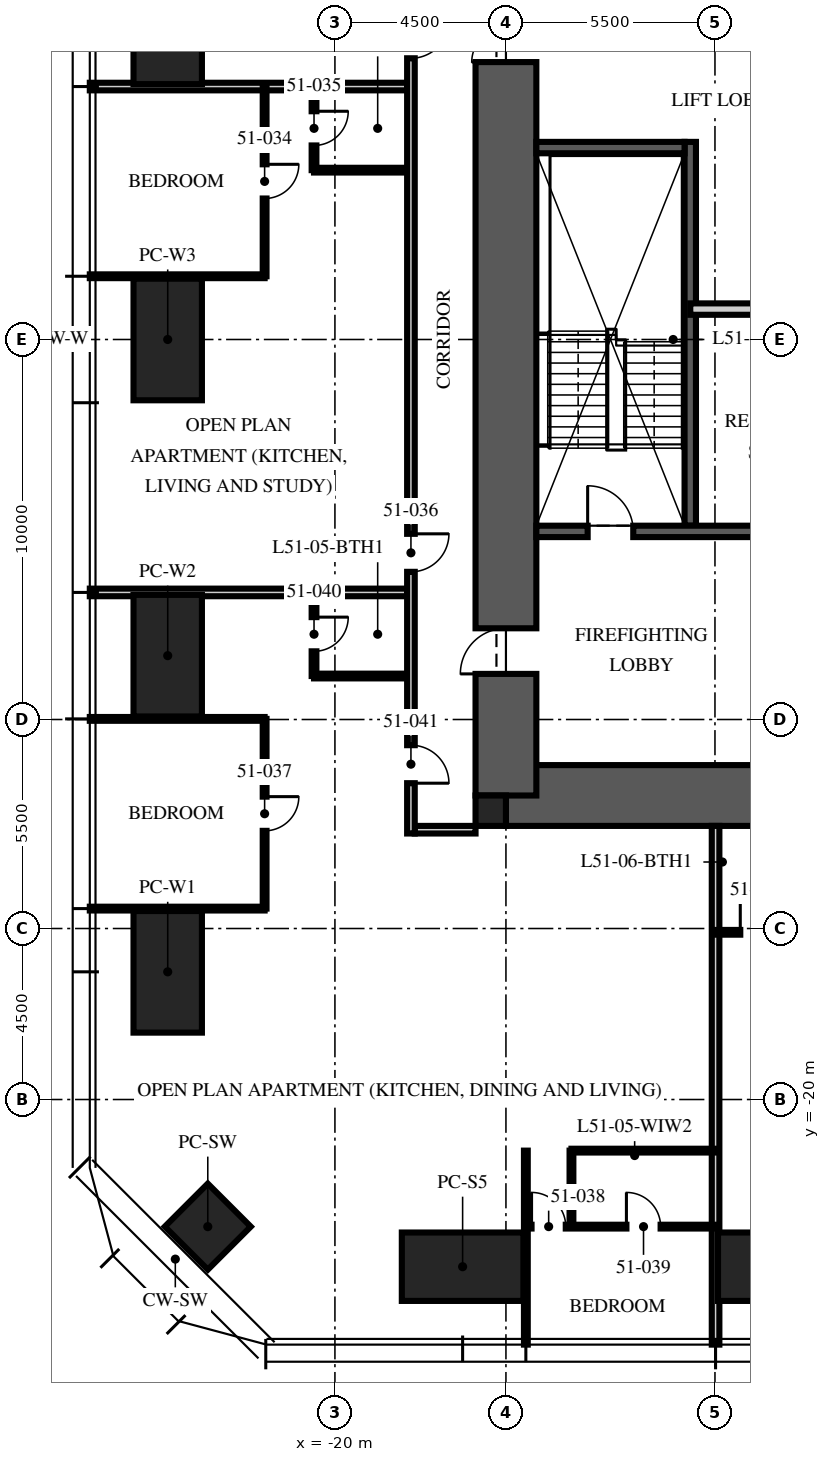
"""IFC4 building model, lengths in metres.
Left out: names, types, materials, properties, quantities, classifications, styles, units other than length and angle.
Written with IfcOpenShell. Run it as: python <this file> out.ifc"""

import sys

from ifc_helpers import new_model, si_unit, direction, frame, frame_2d, origin, origin_2d, place, context, subcontext, project, spatial, rectangle, hollow_rectangle, extrude, element, fill, save


model = new_model("IFC4")
c1 = context("Model", 3, precision=1e-05, world=origin(), true_north=direction((0.0, 1.0)))
c2 = subcontext(c1, "Body", "Model", "MODEL_VIEW")
j1 = project(units=[si_unit("LENGTHUNIT", "METRE"), si_unit("PLANEANGLEUNIT", "RADIAN")], contexts=[c1])
p1 = place(None, origin())
s1 = spatial("IfcSite", under=j1, at=p1, CompositionType="ELEMENT")
p2 = place(p1, origin())
s2 = spatial("IfcBuilding", under=s1, at=p2, CompositionType="ELEMENT")
p3 = place(p2, frame((0.0, 0.0, 207.0)))
s3 = spatial("IfcBuildingStorey", under=s2, at=p3, CompositionType="ELEMENT", Elevation=207.0)
p4 = place(p3, frame((-15.5, -12.0, -0.25), z_axis=(0.0, 0.0, 1.0), x_axis=(1.0, 0.0, 0.0)))
e1 = element("IfcWall", 1, at=p4, inside=s3, PredefinedType="SHEAR", context=c2, shape_type="SweptSolid", body=[
    extrude(rectangle(XDim=31.0, YDim=1.6, at=frame_2d((15.5, 0.0))), origin(), (0.0, 0.0, 1.0), 3.75),
])
p5 = place(p3, frame((-15.5, -12.0, -0.25), z_axis=(0.0, 0.0, 1.0), x_axis=(0.0, 1.0, 0.0)))
e2 = element("IfcWall", 2, at=p5, inside=s3, PredefinedType="SHEAR", context=c2, shape_type="SweptSolid", body=[
    extrude(rectangle(XDim=24.0, YDim=1.6, at=frame_2d((12.0, 0.0))), origin(), (0.0, 0.0, 1.0), 3.75),
])
p6 = place(p5, frame((3.2, 0.0, 0.25)))
e3 = element("IfcOpeningElement", 3, at=p6, cuts=e2, PredefinedType="OPENING", context=c2, shape_type="SweptSolid", body=[
    extrude(rectangle(XDim=1.2, YDim=2.1, at=frame_2d((0.6, 1.05))), frame((0.0, 0.81, 0.0), z_axis=(0.0, -1.0, 0.0), x_axis=(1.0, 0.0, 0.0)), (0.0, 0.0, 1.0), 1.62),
])
p7 = place(p5, frame((19.3, 0.0, 0.25)))
e4 = element("IfcOpeningElement", 4, at=p7, cuts=e2, PredefinedType="OPENING", context=c2, shape_type="SweptSolid", body=[
    extrude(rectangle(XDim=1.8, YDim=2.1, at=frame_2d((0.9, 1.05))), frame((0.0, 0.81, 0.0), z_axis=(0.0, -1.0, 0.0), x_axis=(1.0, 0.0, 0.0)), (0.0, 0.0, 1.0), 1.62),
])
p8 = place(p3, frame((-15.9, -12.4, -0.25), z_axis=(0.0, 0.0, 1.0), x_axis=(1.0, 0.0, 0.0)))
e5 = element("IfcColumn", 5, at=p8, inside=s3, PredefinedType="COLUMN", context=c2, shape_type="SweptSolid", body=[
    extrude(rectangle(XDim=0.8, YDim=0.8, at=origin_2d()), origin(), (0.0, 0.0, 1.0), 3.75),
])
for number, where, z_axis, x_axis in (
    (6, (-8.32, -24.4, 0.0), (0.0, 0.0, 1.0), (1.0, 0.0, 0.0)),
    (7, (-16.64, -24.4, 0.0), (0.0, 0.0, 1.0), (1.0, 0.0, 0.0)),
    (8, (-24.4, -16.64, 0.0), (0.0, 0.0, 1.0), (0.0, 1.0, 0.0)),
    (9, (-24.4, -8.32, 0.0), (0.0, 0.0, 1.0), (0.0, 1.0, 0.0)),
    (10, (-24.4, 0.0, 0.0), (0.0, 0.0, 1.0), (0.0, 1.0, 0.0)),
    (11, (-24.4, 8.32, 0.0), (0.0, 0.0, 1.0), (0.0, 1.0, 0.0)),
):
    element("IfcColumn", number, at=place(p3, frame(where, z_axis=z_axis, x_axis=x_axis)), inside=s3, PredefinedType="COLUMN", context=c2, shape_type="SweptSolid", body=[
        extrude(hollow_rectangle(XDim=3.2, YDim=1.8, WallThickness=0.2, at=origin_2d()), origin(), (0.0, 0.0, 1.0), 3.75),
    ])
p9 = place(p3, frame((-23.346, -23.346, 0.0), z_axis=(0.0, 0.0, 1.0), x_axis=(0.707106781187, -0.707106781187, 0.0)))
e12 = element("IfcColumn", 12, at=p9, inside=s3, PredefinedType="COLUMN", context=c2, shape_type="SweptSolid", body=[
    extrude(hollow_rectangle(XDim=1.6, YDim=1.6, WallThickness=0.1, at=origin_2d()), origin(), (0.0, 0.0, 1.0), 3.75),
])
p10 = place(p3, frame((-10.65, -4.9, 0.0), z_axis=(0.0, 0.0, 1.0), x_axis=(0.0, 1.0, 0.0)))
e13 = element("IfcWall", 13, at=p10, inside=s3, PredefinedType="SOLIDWALL", context=c2, shape_type="SweptSolid", body=[
    extrude(rectangle(XDim=10.1, YDim=0.3, at=frame_2d((5.05, 0.0))), origin(), (0.0, 0.0, 1.0), 3.5),
])
p11 = place(p3, frame((-14.7, -5.05, 0.0), z_axis=(0.0, 0.0, 1.0), x_axis=(1.0, 0.0, 0.0)))
e14 = element("IfcWall", 14, at=p11, inside=s3, PredefinedType="SOLIDWALL", context=c2, shape_type="SweptSolid", body=[
    extrude(rectangle(XDim=5.9, YDim=0.3, at=frame_2d((2.95, 0.0))), origin(), (0.0, 0.0, 1.0), 3.5),
])
p12 = place(p11, frame((1.35, 0.0, 0.0)))
e15 = element("IfcOpeningElement", 15, at=p12, cuts=e14, PredefinedType="OPENING", context=c2, shape_type="SweptSolid", body=[
    extrude(rectangle(XDim=1.2, YDim=2.1, at=frame_2d((0.6, 1.05))), frame((0.0, 0.16, 0.0), z_axis=(0.0, -1.0, 0.0), x_axis=(1.0, 0.0, 0.0)), (0.0, 0.0, 1.0), 0.32),
])
p13 = place(p3, frame((-14.7, 5.05, 0.0), z_axis=(0.0, 0.0, 1.0), x_axis=(1.0, 0.0, 0.0)))
e16 = element("IfcWall", 16, at=p13, inside=s3, PredefinedType="SOLIDWALL", context=c2, shape_type="SweptSolid", body=[
    extrude(rectangle(XDim=3.9, YDim=0.3, at=frame_2d((1.95, 0.0))), origin(), (0.0, 0.0, 1.0), 3.5),
])
p14 = place(p3, frame((-10.65, 0.8, 0.0), z_axis=(0.0, 0.0, 1.0), x_axis=(1.0, 0.0, 0.0)))
e17 = element("IfcWall", 17, at=p14, inside=s3, PredefinedType="PARTITIONING", context=c2, shape_type="SweptSolid", body=[
    extrude(rectangle(XDim=21.3, YDim=0.3, at=frame_2d((10.65, 0.0))), origin(), (0.0, 0.0, 1.0), 3.5),
])
p15 = place(p14, frame((10.05, 0.0, 0.0)))
e18 = element("IfcOpeningElement", 18, at=p15, cuts=e17, PredefinedType="OPENING", context=c2, shape_type="SweptSolid", body=[
    extrude(rectangle(XDim=1.2, YDim=2.1, at=frame_2d((0.6, 1.05))), frame((0.0, 0.16, 0.0), z_axis=(0.0, -1.0, 0.0), x_axis=(1.0, 0.0, 0.0)), (0.0, 0.0, 1.0), 0.32),
])
p16 = place(p14, frame((1.74, 0.0, 0.0)))
e19 = element("IfcOpeningElement", 19, at=p16, cuts=e17, PredefinedType="OPENING", context=c2, shape_type="SweptSolid", body=[
    extrude(rectangle(XDim=0.9, YDim=2.1, at=frame_2d((0.45, 1.05))), frame((0.0, 0.16, 0.0), z_axis=(0.0, -1.0, 0.0), x_axis=(1.0, 0.0, 0.0)), (0.0, 0.0, 1.0), 0.32),
])
p17 = place(p3, frame((-16.3, -12.9, 0.0), z_axis=(0.0, 0.0, 1.0), x_axis=(-1.0, 0.0, 0.0)))
e20 = element("IfcWall", 20, at=p17, inside=s3, PredefinedType="PARTITIONING", context=c2, shape_type="SweptSolid", body=[
    extrude(rectangle(XDim=1.6, YDim=0.2, at=frame_2d((0.8, 0.0))), origin(), (0.0, 0.0, 1.0), 2.3),
])
p18 = place(p3, frame((-18.1, 6.656, 0.0), z_axis=(0.0, 0.0, 1.0), x_axis=(-1.0, 0.0, 0.0)))
e21 = element("IfcWall", 21, at=p18, inside=s3, PredefinedType="PARTITIONING", context=c2, shape_type="SweptSolid", body=[
    extrude(rectangle(XDim=8.35, YDim=0.2, at=frame_2d((4.175, 0.0))), origin(), (0.0, 0.0, 1.0), 2.91),
])
p19 = place(p3, frame((-21.85, 1.664, 0.0), z_axis=(0.0, 0.0, 1.0), x_axis=(-1.0, 0.0, 0.0)))
e22 = element("IfcWall", 22, at=p19, inside=s3, PredefinedType="PARTITIONING", context=c2, shape_type="SweptSolid", body=[
    extrude(rectangle(XDim=4.6, YDim=0.1, at=frame_2d((2.3, 0.0))), origin(), (0.0, 0.0, 1.0), 2.91),
])
p20 = place(p3, frame((-18.1, -6.656, 0.0), z_axis=(0.0, 0.0, 1.0), x_axis=(-1.0, 0.0, 0.0)))
e23 = element("IfcWall", 23, at=p20, inside=s3, PredefinedType="PARTITIONING", context=c2, shape_type="SweptSolid", body=[
    extrude(rectangle(XDim=8.35, YDim=0.2, at=frame_2d((4.175, 0.0))), origin(), (0.0, 0.0, 1.0), 2.91),
])
for number, where, z_axis, x_axis in (
    (24, (-21.85, -9.984, 0.0), (0.0, 0.0, 1.0), (-1.0, 0.0, 0.0)),
    (25, (-21.85, -14.976, 0.0), (0.0, 0.0, 1.0), (-1.0, 0.0, 0.0)),
):
    element("IfcWall", number, at=place(p3, frame(where, z_axis=z_axis, x_axis=x_axis)), inside=s3, PredefinedType="PARTITIONING", context=c2, shape_type="SweptSolid", body=[
        extrude(rectangle(XDim=4.6, YDim=0.1, at=frame_2d((2.3, 0.0))), origin(), (0.0, 0.0, 1.0), 2.91),
    ])
p21 = place(p3, frame((-14.976, -21.345, 0.0), z_axis=(0.0, 0.0, 1.0), x_axis=(0.0, -1.0, 0.0)))
e26 = element("IfcWall", 26, at=p21, inside=s3, PredefinedType="PARTITIONING", context=c2, shape_type="SweptSolid", body=[
    extrude(rectangle(XDim=5.105, YDim=0.1, at=frame_2d((2.552, 0.0))), origin(), (0.0, 0.0, 1.0), 2.91),
])
p22 = place(p3, frame((-9.984, -12.8, 0.0), z_axis=(0.0, 0.0, 1.0), x_axis=(0.0, -1.0, 0.0)))
e27 = element("IfcWall", 27, at=p22, inside=s3, PredefinedType="PARTITIONING", context=c2, shape_type="SweptSolid", body=[
    extrude(rectangle(XDim=13.65, YDim=0.2, at=frame_2d((6.825, 0.0))), origin(), (0.0, 0.0, 1.0), 2.91),
])
p23 = place(p3, frame((-21.85, 6.656, 0.0), z_axis=(0.0, 0.0, 1.0), x_axis=(0.0, -1.0, 0.0)))
e28 = element("IfcWall", 28, at=p23, inside=s3, PredefinedType="PARTITIONING", context=c2, shape_type="SweptSolid", body=[
    extrude(rectangle(XDim=4.992, YDim=0.1, at=frame_2d((2.496, 0.0))), origin(), (0.0, 0.0, 1.0), 2.81),
])
p24 = place(p23, frame((2.046, 0.0, 0.0)))
e29 = element("IfcOpeningElement", 29, at=p24, cuts=e28, PredefinedType="OPENING", context=c2, shape_type="SweptSolid", body=[
    extrude(rectangle(XDim=0.9, YDim=2.1, at=frame_2d((0.45, 1.05))), frame((0.0, 0.06, 0.0), z_axis=(0.0, -1.0, 0.0), x_axis=(1.0, 0.0, 0.0)), (0.0, 0.0, 1.0), 0.12),
])
p25 = place(p3, frame((-20.55, 6.656, 0.0), z_axis=(0.0, 0.0, 1.0), x_axis=(0.0, -1.0, 0.0)))
e30 = element("IfcWall", 30, at=p25, inside=s3, PredefinedType="PARTITIONING", context=c2, shape_type="SweptSolid", body=[
    extrude(rectangle(XDim=2.2, YDim=0.125, at=frame_2d((1.1, 0.0))), origin(), (0.0, 0.0, 1.0), 3.5),
])
p26 = place(p25, frame((0.65, 0.0, 0.0)))
e31 = element("IfcOpeningElement", 31, at=p26, cuts=e30, PredefinedType="OPENING", context=c2, shape_type="SweptSolid", body=[
    extrude(rectangle(XDim=0.9, YDim=2.1, at=frame_2d((0.45, 1.05))), frame((0.0, 0.073, 0.0), z_axis=(0.0, -1.0, 0.0), x_axis=(1.0, 0.0, 0.0)), (0.0, 0.0, 1.0), 0.145),
])
p27 = place(p3, frame((-18.1, 4.456, 0.0), z_axis=(0.0, 0.0, 1.0), x_axis=(-1.0, 0.0, 0.0)))
e32 = element("IfcWall", 32, at=p27, inside=s3, PredefinedType="PARTITIONING", context=c2, shape_type="SweptSolid", body=[
    extrude(rectangle(XDim=2.45, YDim=0.125, at=frame_2d((1.225, 0.0))), origin(), (0.0, 0.0, 1.0), 3.5),
])
p28 = place(p3, frame((-21.85, -9.984, 0.0), z_axis=(0.0, 0.0, 1.0), x_axis=(0.0, -1.0, 0.0)))
e33 = element("IfcWall", 33, at=p28, inside=s3, PredefinedType="PARTITIONING", context=c2, shape_type="SweptSolid", body=[
    extrude(rectangle(XDim=4.992, YDim=0.1, at=frame_2d((2.496, 0.0))), origin(), (0.0, 0.0, 1.0), 2.81),
])
p29 = place(p28, frame((2.046, 0.0, 0.0)))
e34 = element("IfcOpeningElement", 34, at=p29, cuts=e33, PredefinedType="OPENING", context=c2, shape_type="SweptSolid", body=[
    extrude(rectangle(XDim=0.9, YDim=2.1, at=frame_2d((0.45, 1.05))), frame((0.0, 0.06, 0.0), z_axis=(0.0, -1.0, 0.0), x_axis=(1.0, 0.0, 0.0)), (0.0, 0.0, 1.0), 0.12),
])
p30 = place(p3, frame((-14.976, -23.345, 0.0), z_axis=(0.0, 0.0, 1.0), x_axis=(1.0, 0.0, 0.0)))
e35 = element("IfcWall", 35, at=p30, inside=s3, PredefinedType="PARTITIONING", context=c2, shape_type="SweptSolid", body=[
    extrude(rectangle(XDim=4.992, YDim=0.1, at=frame_2d((2.496, 0.0))), origin(), (0.0, 0.0, 1.0), 2.81),
])
p31 = place(p30, frame((0.15, 0.0, 0.0)))
e36 = element("IfcOpeningElement", 36, at=p31, cuts=e35, PredefinedType="OPENING", context=c2, shape_type="SweptSolid", body=[
    extrude(rectangle(XDim=0.9, YDim=2.1, at=frame_2d((0.45, 1.05))), frame((0.0, 0.06, 0.0), z_axis=(0.0, -1.0, 0.0), x_axis=(1.0, 0.0, 0.0)), (0.0, 0.0, 1.0), 0.12),
])
p32 = place(p30, frame((2.646, 0.0, 0.0)))
e37 = element("IfcOpeningElement", 37, at=p32, cuts=e35, PredefinedType="OPENING", context=c2, shape_type="SweptSolid", body=[
    extrude(rectangle(XDim=0.9, YDim=2.1, at=frame_2d((0.45, 1.05))), frame((0.0, 0.06, 0.0), z_axis=(0.0, -1.0, 0.0), x_axis=(1.0, 0.0, 0.0)), (0.0, 0.0, 1.0), 0.12),
])
p33 = place(p3, frame((-13.776, -21.345, 0.0), z_axis=(0.0, 0.0, 1.0), x_axis=(0.0, -1.0, 0.0)))
e38 = element("IfcWall", 38, at=p33, inside=s3, PredefinedType="PARTITIONING", context=c2, shape_type="SweptSolid", body=[
    extrude(rectangle(XDim=2.0, YDim=0.1, at=frame_2d((1.0, 0.0))), origin(), (0.0, 0.0, 1.0), 3.5),
])
p34 = place(p3, frame((-13.776, -21.345, 0.0), z_axis=(0.0, 0.0, 1.0), x_axis=(1.0, 0.0, 0.0)))
e39 = element("IfcWall", 39, at=p34, inside=s3, PredefinedType="PARTITIONING", context=c2, shape_type="SweptSolid", body=[
    extrude(rectangle(XDim=3.792, YDim=0.1, at=frame_2d((1.896, 0.0))), origin(), (0.0, 0.0, 1.0), 2.81),
])
p35 = place(p3, frame((-20.55, -6.656, 0.0), z_axis=(0.0, 0.0, 1.0), x_axis=(0.0, -1.0, 0.0)))
e40 = element("IfcWall", 40, at=p35, inside=s3, PredefinedType="PARTITIONING", context=c2, shape_type="SweptSolid", body=[
    extrude(rectangle(XDim=2.2, YDim=0.125, at=frame_2d((1.1, 0.0))), origin(), (0.0, 0.0, 1.0), 2.6),
])
p36 = place(p35, frame((0.65, 0.0, 0.0)))
e41 = element("IfcOpeningElement", 41, at=p36, cuts=e40, PredefinedType="OPENING", context=c2, shape_type="SweptSolid", body=[
    extrude(rectangle(XDim=0.9, YDim=2.1, at=frame_2d((0.45, 1.05))), frame((0.0, 0.073, 0.0), z_axis=(0.0, -1.0, 0.0), x_axis=(1.0, 0.0, 0.0)), (0.0, 0.0, 1.0), 0.145),
])
p37 = place(p3, frame((-18.1, -8.856, 0.0), z_axis=(0.0, 0.0, 1.0), x_axis=(-1.0, 0.0, 0.0)))
e42 = element("IfcWall", 42, at=p37, inside=s3, PredefinedType="PARTITIONING", context=c2, shape_type="SweptSolid", body=[
    extrude(rectangle(XDim=2.45, YDim=0.125, at=frame_2d((1.225, 0.0))), origin(), (0.0, 0.0, 1.0), 3.5),
])
p38 = place(p3, frame((-9.984, -15.6, 0.0), z_axis=(0.0, 0.0, 1.0), x_axis=(1.0, 0.0, 0.0)))
e43 = element("IfcWall", 43, at=p38, inside=s3, PredefinedType="PARTITIONING", context=c2, shape_type="SweptSolid", body=[
    extrude(rectangle(XDim=4.0, YDim=0.125, at=frame_2d((2.0, 0.0))), origin(), (0.0, 0.0, 1.0), 2.6),
])
p39 = place(p38, frame((0.65, 0.0, 0.0)))
e44 = element("IfcOpeningElement", 44, at=p39, cuts=e43, PredefinedType="OPENING", context=c2, shape_type="SweptSolid", body=[
    extrude(rectangle(XDim=0.9, YDim=2.1, at=frame_2d((0.45, 1.05))), frame((0.0, 0.073, 0.0), z_axis=(0.0, -1.0, 0.0), x_axis=(1.0, 0.0, 0.0)), (0.0, 0.0, 1.0), 0.145),
])
p40 = place(p38, frame((2.65, 0.0, 0.0)))
e45 = element("IfcOpeningElement", 45, at=p40, cuts=e43, PredefinedType="OPENING", context=c2, shape_type="SweptSolid", body=[
    extrude(rectangle(XDim=0.9, YDim=2.1, at=frame_2d((0.45, 1.05))), frame((0.0, 0.073, 0.0), z_axis=(0.0, -1.0, 0.0), x_axis=(1.0, 0.0, 0.0)), (0.0, 0.0, 1.0), 0.145),
])
p41 = place(p3, frame((-18.0, 13.0, 0.0), z_axis=(0.0, 0.0, 1.0), x_axis=(0.0, -1.0, 0.0)))
e46 = element("IfcWall", 46, at=p41, inside=s3, PredefinedType="PARTITIONING", context=c2, shape_type="SweptSolid", body=[
    extrude(rectangle(XDim=26.0, YDim=0.2, at=frame_2d((13.0, 0.0))), origin(), (0.0, 0.0, 1.0), 2.6),
])
p42 = place(p41, frame((4.6, 0.0, 0.0)))
e47 = element("IfcOpeningElement", 47, at=p42, cuts=e46, PredefinedType="OPENING", context=c2, shape_type="SweptSolid", body=[
    extrude(rectangle(XDim=1.0, YDim=2.2, at=frame_2d((0.5, 1.1))), frame((0.0, 0.11, 0.0), z_axis=(0.0, -1.0, 0.0), x_axis=(1.0, 0.0, 0.0)), (0.0, 0.0, 1.0), 0.22),
])
p43 = place(p41, frame((18.114, 0.0, 0.0)))
e48 = element("IfcOpeningElement", 48, at=p43, cuts=e46, PredefinedType="OPENING", context=c2, shape_type="SweptSolid", body=[
    extrude(rectangle(XDim=1.0, YDim=2.2, at=frame_2d((0.5, 1.1))), frame((0.0, 0.11, 0.0), z_axis=(0.0, -1.0, 0.0), x_axis=(1.0, 0.0, 0.0)), (0.0, 0.0, 1.0), 0.22),
])
p44 = place(p41, frame((23.676, 0.0, 0.0)))
e49 = element("IfcOpeningElement", 49, at=p44, cuts=e46, PredefinedType="OPENING", context=c2, shape_type="SweptSolid", body=[
    extrude(rectangle(XDim=1.0, YDim=2.2, at=frame_2d((0.5, 1.1))), frame((0.0, 0.11, 0.0), z_axis=(0.0, -1.0, 0.0), x_axis=(1.0, 0.0, 0.0)), (0.0, 0.0, 1.0), 0.22),
])
p45 = place(p12, origin())
e50 = element("IfcDoor", 50, at=p45, inside=s3, OperationType="SINGLE_SWING_LEFT", PredefinedType="DOOR", context=c2, shape_type="SweptSolid", body=[
    extrude(rectangle(XDim=1.2, YDim=2.1, at=frame_2d((0.6, 1.05))), frame((0.0, 0.025, 0.0), z_axis=(0.0, -1.0, 0.0), x_axis=(1.0, 0.0, 0.0)), (0.0, 0.0, 1.0), 0.05),
])
fill(e15, e50)
p46 = place(p6, origin())
e51 = element("IfcDoor", 51, at=p46, inside=s3, OperationType="SINGLE_SWING_LEFT", PredefinedType="DOOR", context=c2, shape_type="SweptSolid", body=[
    extrude(rectangle(XDim=1.2, YDim=2.1, at=frame_2d((0.6, 1.05))), frame((0.0, 0.025, 0.0), z_axis=(0.0, -1.0, 0.0), x_axis=(1.0, 0.0, 0.0)), (0.0, 0.0, 1.0), 0.05),
])
fill(e3, e51)
p47 = place(p7, origin())
e52 = element("IfcDoor", 52, at=p47, inside=s3, OperationType="DOUBLE_DOOR_SINGLE_SWING", PredefinedType="DOOR", context=c2, shape_type="SweptSolid", body=[
    extrude(rectangle(XDim=1.8, YDim=2.1, at=frame_2d((0.9, 1.05))), frame((0.0, 0.025, 0.0), z_axis=(0.0, -1.0, 0.0), x_axis=(1.0, 0.0, 0.0)), (0.0, 0.0, 1.0), 0.05),
])
fill(e4, e52)
p48 = place(p42, origin())
e53 = element("IfcDoor", 53, at=p48, inside=s3, OperationType="SINGLE_SWING_LEFT", PredefinedType="DOOR", context=c2, shape_type="SweptSolid", body=[
    extrude(rectangle(XDim=1.0, YDim=2.2, at=frame_2d((0.5, 1.1))), frame((0.0, 0.025, 0.0), z_axis=(0.0, -1.0, 0.0), x_axis=(1.0, 0.0, 0.0)), (0.0, 0.0, 1.0), 0.05),
])
fill(e47, e53)
p49 = place(p24, origin())
e54 = element("IfcDoor", 54, at=p49, inside=s3, OperationType="SINGLE_SWING_LEFT", PredefinedType="DOOR", context=c2, shape_type="SweptSolid", body=[
    extrude(rectangle(XDim=0.9, YDim=2.1, at=frame_2d((0.45, 1.05))), frame((0.0, 0.025, 0.0), z_axis=(0.0, -1.0, 0.0), x_axis=(1.0, 0.0, 0.0)), (0.0, 0.0, 1.0), 0.05),
])
fill(e29, e54)
p50 = place(p26, origin())
e55 = element("IfcDoor", 55, at=p50, inside=s3, OperationType="SINGLE_SWING_LEFT", PredefinedType="DOOR", context=c2, shape_type="SweptSolid", body=[
    extrude(rectangle(XDim=0.9, YDim=2.1, at=frame_2d((0.45, 1.05))), frame((0.0, 0.025, 0.0), z_axis=(0.0, -1.0, 0.0), x_axis=(1.0, 0.0, 0.0)), (0.0, 0.0, 1.0), 0.05),
])
fill(e31, e55)
p51 = place(p43, origin())
e56 = element("IfcDoor", 56, at=p51, inside=s3, OperationType="SINGLE_SWING_LEFT", PredefinedType="DOOR", context=c2, shape_type="SweptSolid", body=[
    extrude(rectangle(XDim=1.0, YDim=2.2, at=frame_2d((0.5, 1.1))), frame((0.0, 0.025, 0.0), z_axis=(0.0, -1.0, 0.0), x_axis=(1.0, 0.0, 0.0)), (0.0, 0.0, 1.0), 0.05),
])
fill(e48, e56)
p52 = place(p29, origin())
e57 = element("IfcDoor", 57, at=p52, inside=s3, OperationType="SINGLE_SWING_LEFT", PredefinedType="DOOR", context=c2, shape_type="SweptSolid", body=[
    extrude(rectangle(XDim=0.9, YDim=2.1, at=frame_2d((0.45, 1.05))), frame((0.0, 0.025, 0.0), z_axis=(0.0, -1.0, 0.0), x_axis=(1.0, 0.0, 0.0)), (0.0, 0.0, 1.0), 0.05),
])
fill(e34, e57)
p53 = place(p31, origin())
e58 = element("IfcDoor", 58, at=p53, inside=s3, OperationType="SINGLE_SWING_LEFT", PredefinedType="DOOR", context=c2, shape_type="SweptSolid", body=[
    extrude(rectangle(XDim=0.9, YDim=2.1, at=frame_2d((0.45, 1.05))), frame((0.0, 0.025, 0.0), z_axis=(0.0, -1.0, 0.0), x_axis=(1.0, 0.0, 0.0)), (0.0, 0.0, 1.0), 0.05),
])
fill(e36, e58)
p54 = place(p32, origin())
e59 = element("IfcDoor", 59, at=p54, inside=s3, OperationType="SINGLE_SWING_LEFT", PredefinedType="DOOR", context=c2, shape_type="SweptSolid", body=[
    extrude(rectangle(XDim=0.9, YDim=2.1, at=frame_2d((0.45, 1.05))), frame((0.0, 0.025, 0.0), z_axis=(0.0, -1.0, 0.0), x_axis=(1.0, 0.0, 0.0)), (0.0, 0.0, 1.0), 0.05),
])
fill(e37, e59)
p55 = place(p36, origin())
e60 = element("IfcDoor", 60, at=p55, inside=s3, OperationType="SINGLE_SWING_LEFT", PredefinedType="DOOR", context=c2, shape_type="SweptSolid", body=[
    extrude(rectangle(XDim=0.9, YDim=2.1, at=frame_2d((0.45, 1.05))), frame((0.0, 0.025, 0.0), z_axis=(0.0, -1.0, 0.0), x_axis=(1.0, 0.0, 0.0)), (0.0, 0.0, 1.0), 0.05),
])
fill(e41, e60)
p56 = place(p44, origin())
e61 = element("IfcDoor", 61, at=p56, inside=s3, OperationType="SINGLE_SWING_RIGHT", PredefinedType="DOOR", context=c2, shape_type="SweptSolid", body=[
    extrude(rectangle(XDim=1.0, YDim=2.2, at=frame_2d((0.5, 1.1))), frame((0.0, 0.025, 0.0), z_axis=(0.0, -1.0, 0.0), x_axis=(1.0, 0.0, 0.0)), (0.0, 0.0, 1.0), 0.05),
])
fill(e49, e61)
p57 = place(p39, origin())
e62 = element("IfcDoor", 62, at=p57, inside=s3, OperationType="SINGLE_SWING_LEFT", PredefinedType="DOOR", context=c2, shape_type="SweptSolid", body=[
    extrude(rectangle(XDim=0.9, YDim=2.1, at=frame_2d((0.45, 1.05))), frame((0.0, 0.025, 0.0), z_axis=(0.0, -1.0, 0.0), x_axis=(1.0, 0.0, 0.0)), (0.0, 0.0, 1.0), 0.05),
])
fill(e44, e62)
save(model, sys.argv[1])
